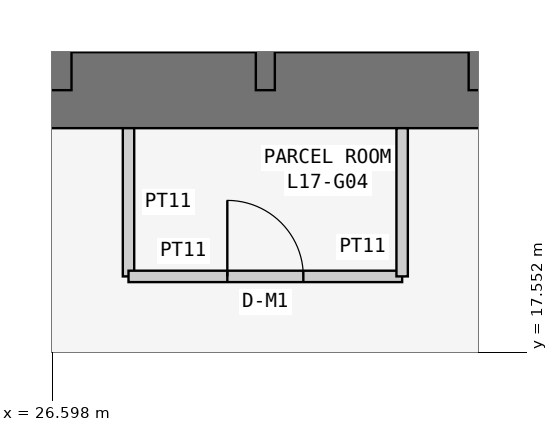
"""IFC4 building model, lengths in metres.
Left out: names, types, materials, properties, quantities, classifications, styles, units other than length and angle.
Written with IfcOpenShell. Run it as: python <this file> out.ifc"""

import sys

from ifc_helpers import new_model, si_unit, direction, frame, frame_2d, origin, place, context, subcontext, project, spatial, rectangle, extrude, element, fill, save


model = new_model("IFC4")
c1 = context("Model", 3, precision=1e-05, world=origin(), true_north=direction((0.0, 1.0)))
c2 = subcontext(c1, "Body", "Model", "MODEL_VIEW")
j1 = project(units=[si_unit("LENGTHUNIT", "METRE"), si_unit("PLANEANGLEUNIT", "RADIAN")], contexts=[c1])
p1 = place(None, origin())
s1 = spatial("IfcSite", under=j1, at=p1, CompositionType="ELEMENT")
p2 = place(p1, origin())
s2 = spatial("IfcBuilding", under=s1, at=p2, CompositionType="ELEMENT")
p3 = place(p2, frame((0.0, 0.0, 70.5)))
s3 = spatial("IfcBuildingStorey", under=s2, at=p3, CompositionType="ELEMENT", Elevation=70.5)
p4 = place(p3, frame((21.0, 21.0, 0.0), z_axis=(0.0, 0.0, 1.0), x_axis=(1.0, 0.0, 0.0)))
e1 = element("IfcWall", 1, at=p4, inside=s3, PredefinedType="SHEAR", context=c2, shape_type="SweptSolid", body=[
    extrude(rectangle(XDim=17.3, YDim=1.0, at=frame_2d((8.65, 0.0))), origin(), (0.0, 0.0, 1.0), 3.6),
])
p5 = place(p3, frame((26.6, 21.0, 0.0), z_axis=(0.0, 0.0, 1.0), x_axis=(0.0, 1.0, 0.0)))
e2 = element("IfcWall", 2, at=p5, inside=s3, PredefinedType="SHEAR", context=c2, shape_type="SweptSolid", body=[
    extrude(rectangle(XDim=16.8, YDim=0.5, at=frame_2d((8.4, 0.0))), origin(), (0.0, 0.0, 1.0), 3.6),
])
p6 = place(p5, frame((10.4, 0.0, 0.0)))
e3 = element("IfcOpeningElement", 3, at=p6, cuts=e2, PredefinedType="OPENING", context=c2, shape_type="SweptSolid", body=[
    extrude(rectangle(XDim=1.2, YDim=2.1, at=frame_2d((0.6, 1.05))), frame((0.0, 0.26, 0.0), z_axis=(0.0, -1.0, 0.0), x_axis=(1.0, 0.0, 0.0)), (0.0, 0.0, 1.0), 0.52),
])
for number, where, z_axis, x_axis in (
    (4, (29.4, 21.0, 0.0), (0.0, 0.0, 1.0), (0.0, 1.0, 0.0)),
    (5, (32.2, 21.0, 0.0), (0.0, 0.0, 1.0), (0.0, 1.0, 0.0)),
):
    element("IfcWall", number, at=place(p3, frame(where, z_axis=z_axis, x_axis=x_axis)), inside=s3, PredefinedType="SHEAR", context=c2, shape_type="SweptSolid", body=[
        extrude(rectangle(XDim=3.2, YDim=0.25, at=frame_2d((1.6, 0.0))), origin(), (0.0, 0.0, 1.0), 3.6),
    ])
p7 = place(p3, frame((27.6, 20.5, 0.0), z_axis=(0.0, 0.0, 1.0), x_axis=(0.0, -1.0, 0.0)))
e6 = element("IfcWall", 6, at=p7, inside=s3, PredefinedType="PARTITIONING", context=c2, shape_type="SweptSolid", body=[
    extrude(rectangle(XDim=1.95, YDim=0.15, at=frame_2d((0.975, 0.0))), origin(), (0.0, 0.0, 1.0), 3.45),
])
p8 = place(p3, frame((27.6, 18.55, 0.0), z_axis=(0.0, 0.0, 1.0), x_axis=(1.0, 0.0, 0.0)))
e7 = element("IfcWall", 7, at=p8, inside=s3, PredefinedType="PARTITIONING", context=c2, shape_type="SweptSolid", body=[
    extrude(rectangle(XDim=3.6, YDim=0.15, at=frame_2d((1.8, 0.0))), origin(), (0.0, 0.0, 1.0), 3.45),
])
p9 = place(p8, frame((1.3, 0.0, 0.0)))
e8 = element("IfcOpeningElement", 8, at=p9, cuts=e7, PredefinedType="OPENING", context=c2, shape_type="SweptSolid", body=[
    extrude(rectangle(XDim=1.0, YDim=2.1, at=frame_2d((0.5, 1.05))), frame((0.0, 0.085, 0.0), z_axis=(0.0, -1.0, 0.0), x_axis=(1.0, 0.0, 0.0)), (0.0, 0.0, 1.0), 0.17),
])
p10 = place(p3, frame((31.2, 18.55, 0.0), z_axis=(0.0, 0.0, 1.0), x_axis=(0.0, 1.0, 0.0)))
e9 = element("IfcWall", 9, at=p10, inside=s3, PredefinedType="PARTITIONING", context=c2, shape_type="SweptSolid", body=[
    extrude(rectangle(XDim=1.95, YDim=0.15, at=frame_2d((0.975, 0.0))), origin(), (0.0, 0.0, 1.0), 3.45),
])
p11 = place(p9, origin())
e10 = element("IfcDoor", 10, at=p11, inside=s3, OperationType="SINGLE_SWING_LEFT", PredefinedType="DOOR", context=c2, shape_type="SweptSolid", body=[
    extrude(rectangle(XDim=1.0, YDim=2.1, at=frame_2d((0.5, 1.05))), frame((0.0, 0.025, 0.0), z_axis=(0.0, -1.0, 0.0), x_axis=(1.0, 0.0, 0.0)), (0.0, 0.0, 1.0), 0.05),
])
fill(e8, e10)
save(model, sys.argv[1])
